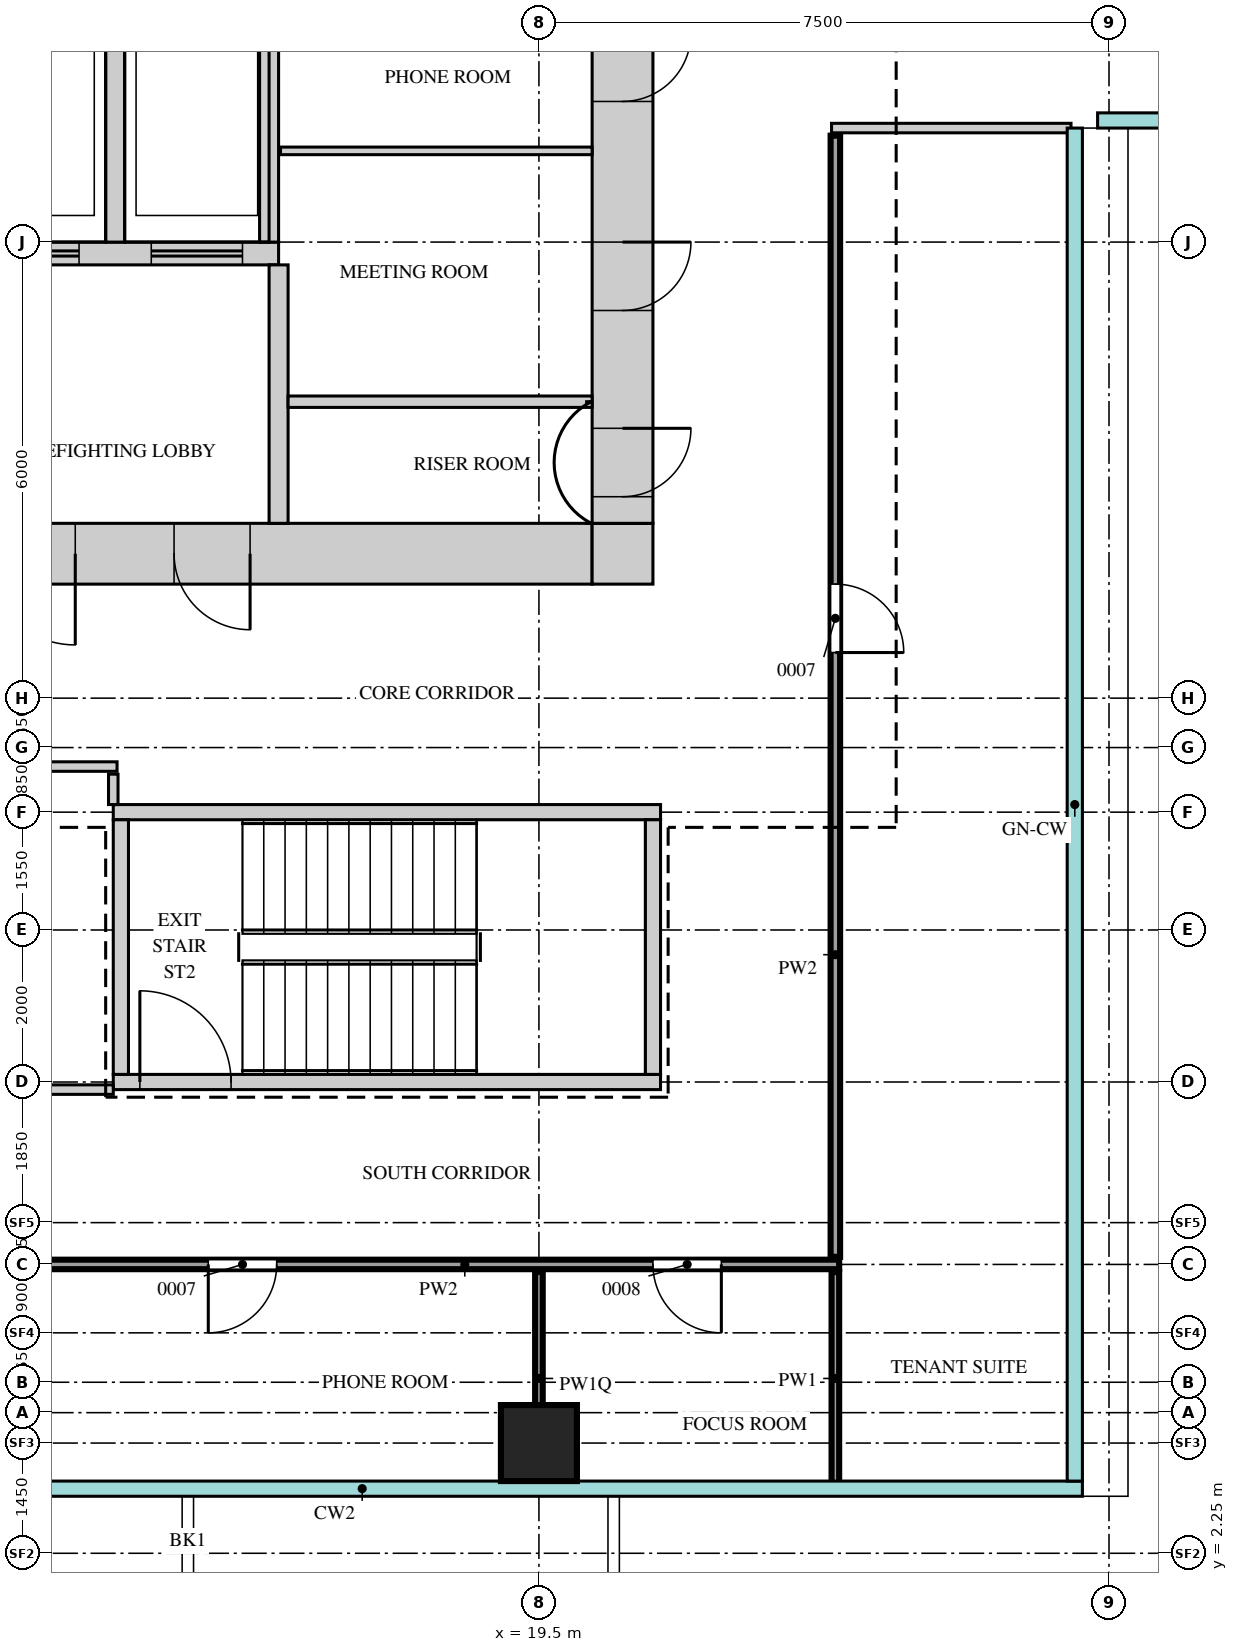
"""IFC4 building model, lengths in metres.
Left out: names, types, materials, properties, quantities, classifications, styles, units other than length and angle.
Written with IfcOpenShell. Run it as: python <this file> out.ifc"""

import sys

from ifc_helpers import new_model, si_unit, direction, frame, frame_2d, origin, origin_2d, place, context, subcontext, project, spatial, rectangle, extrude, source, transform, mapped, element, fill, save


model = new_model("IFC4")
c1 = context("Model", 3, precision=1e-05, world=origin(), true_north=direction((0.0, 1.0)))
c2 = subcontext(c1, "Body", "Model", "MODEL_VIEW")
j1 = project(units=[si_unit("LENGTHUNIT", "METRE"), si_unit("PLANEANGLEUNIT", "RADIAN")], contexts=[c1])
p1 = place(None, origin())
s1 = spatial("IfcSite", under=j1, at=p1, CompositionType="ELEMENT")
p2 = place(p1, origin())
s2 = spatial("IfcBuilding", under=s1, at=p2, CompositionType="ELEMENT")
p3 = place(p2, frame((0.0, 0.0, 172.7)))
s3 = spatial("IfcBuildingStorey", under=s2, at=p3, CompositionType="ELEMENT", Elevation=172.7)
m1 = source(origin(), c2, "Body", "SweptSolid", [
    extrude(rectangle(XDim=13.4, YDim=0.8, at=frame_2d((6.7, 0.0))), origin(), (0.0, 0.0, 1.0), 3.75),
])
p4 = place(p3, frame((6.8, 15.4, 0.0), z_axis=(0.0, 0.0, 1.0), x_axis=(1.0, 0.0, 0.0)))
e1 = element("IfcWall", 1, at=p4, inside=s3, PredefinedType="SHEAR", context=c2, shape_type="MappedRepresentation", body=[
    mapped(m1, transform((0.0, 0.0, 0.0))),
])
m2 = source(origin(), c2, "Body", "SweptSolid", [
    extrude(rectangle(XDim=1.2, YDim=2.1, at=frame_2d((0.6, 1.05))), frame((0.0, 0.41, 0.0), z_axis=(0.0, -1.0, 0.0), x_axis=(1.0, 0.0, 0.0)), (0.0, 0.0, 1.0), 0.82),
])
p5 = place(p4, frame((5.4, 0.0, 0.0)))
e2 = element("IfcOpeningElement", 2, at=p5, cuts=e1, PredefinedType="OPENING", context=c2, shape_type="MappedRepresentation", body=[
    mapped(m2, transform((0.0, 0.0, 0.0))),
])
p6 = place(p4, frame((2.05, 0.0, 0.0)))
e3 = element("IfcOpeningElement", 3, at=p6, cuts=e1, PredefinedType="OPENING", context=c2, shape_type="MappedRepresentation", body=[
    mapped(m2, transform((0.0, 0.0, 0.0))),
])
m3 = source(origin(), c2, "Body", "SweptSolid", [
    extrude(rectangle(XDim=1.0, YDim=2.1, at=frame_2d((0.5, 1.05))), frame((0.0, 0.41, 0.0), z_axis=(0.0, -1.0, 0.0), x_axis=(1.0, 0.0, 0.0)), (0.0, 0.0, 1.0), 0.82),
])
p7 = place(p4, frame((7.9, 0.0, 0.0)))
e4 = element("IfcOpeningElement", 4, at=p7, cuts=e1, PredefinedType="OPENING", context=c2, shape_type="MappedRepresentation", body=[
    mapped(m3, transform((0.0, 0.0, 0.0))),
])
m4 = source(origin(), c2, "Body", "SweptSolid", [
    extrude(rectangle(XDim=0.8, YDim=0.8, at=frame_2d((0.4, 0.0))), origin(), (0.0, 0.0, 1.0), 3.75),
])
p8 = place(p3, frame((20.2, 15.4, 0.0), z_axis=(0.0, 0.0, 1.0), x_axis=(1.0, 0.0, 0.0)))
e5 = element("IfcWall", 5, at=p8, inside=s3, PredefinedType="SHEAR", context=c2, shape_type="MappedRepresentation", body=[
    mapped(m4, transform((0.0, 0.0, 0.0))),
])
m5 = source(origin(), c2, "Body", "SweptSolid", [
    extrude(rectangle(XDim=22.4, YDim=0.8, at=frame_2d((11.2, 0.0))), origin(), (0.0, 0.0, 1.0), 3.75),
])
p9 = place(p3, frame((20.6, 15.8, 0.0), z_axis=(0.0, 0.0, 1.0), x_axis=(0.0, 1.0, 0.0)))
e6 = element("IfcWall", 6, at=p9, inside=s3, PredefinedType="SHEAR", context=c2, shape_type="MappedRepresentation", body=[
    mapped(m5, transform((0.0, 0.0, 0.0))),
])
m6 = source(origin(), c2, "Body", "SweptSolid", [
    extrude(rectangle(XDim=1.8, YDim=2.1, at=frame_2d((0.9, 1.05))), frame((0.0, 0.41, 0.0), z_axis=(0.0, -1.0, 0.0), x_axis=(1.0, 0.0, 0.0)), (0.0, 0.0, 1.0), 0.82),
])
p10 = place(p9, frame((10.7, 0.0, 0.0)))
e7 = element("IfcOpeningElement", 7, at=p10, cuts=e6, PredefinedType="OPENING", context=c2, shape_type="MappedRepresentation", body=[
    mapped(m6, transform((0.0, 0.0, 0.0))),
])
m7 = source(origin(), c2, "Body", "SweptSolid", [
    extrude(rectangle(XDim=0.9, YDim=2.1, at=frame_2d((0.45, 1.05))), frame((0.0, 0.41, 0.0), z_axis=(0.0, -1.0, 0.0), x_axis=(1.0, 0.0, 0.0)), (0.0, 0.0, 1.0), 0.82),
])
p11 = place(p9, frame((0.35, 0.0, 0.0)))
e8 = element("IfcOpeningElement", 8, at=p11, cuts=e6, PredefinedType="OPENING", context=c2, shape_type="MappedRepresentation", body=[
    mapped(m7, transform((0.0, 0.0, 0.0))),
])
p12 = place(p9, frame((2.8, 0.0, 0.0)))
e9 = element("IfcOpeningElement", 9, at=p12, cuts=e6, PredefinedType="OPENING", context=c2, shape_type="MappedRepresentation", body=[
    mapped(m7, transform((0.0, 0.0, 0.0))),
])
p13 = place(p9, frame((5.55, 0.0, 0.0)))
e10 = element("IfcOpeningElement", 10, at=p13, cuts=e6, PredefinedType="OPENING", context=c2, shape_type="MappedRepresentation", body=[
    mapped(m7, transform((0.0, 0.0, 0.0))),
])
m8 = source(origin(), c2, "Body", "SweptSolid", [
    extrude(rectangle(XDim=7.2, YDim=0.2, at=frame_2d((3.6, 0.0))), origin(), (0.0, 0.0, 1.0), 3.75),
])
p14 = place(p3, frame((13.9, 12.0, 0.0), z_axis=(0.0, 0.0, 1.0), x_axis=(1.0, 0.0, 0.0)))
e11 = element("IfcWall", 11, at=p14, inside=s3, PredefinedType="SHEAR", context=c2, shape_type="MappedRepresentation", body=[
    mapped(m8, transform((0.0, 0.0, 0.0))),
])
p15 = place(p3, frame((13.9, 8.45, 0.0), z_axis=(0.0, 0.0, 1.0), x_axis=(1.0, 0.0, 0.0)))
e12 = element("IfcWall", 12, at=p15, inside=s3, PredefinedType="SHEAR", context=c2, shape_type="MappedRepresentation", body=[
    mapped(m8, transform((0.0, 0.0, 0.0))),
])
m9 = source(origin(), c2, "Body", "SweptSolid", [
    extrude(rectangle(XDim=1.2, YDim=2.1, at=frame_2d((0.6, 1.05))), frame((0.0, 0.11, 0.0), z_axis=(0.0, -1.0, 0.0), x_axis=(1.0, 0.0, 0.0)), (0.0, 0.0, 1.0), 0.22),
])
p16 = place(p15, frame((0.35, 0.0, 0.0)))
e13 = element("IfcOpeningElement", 13, at=p16, cuts=e12, PredefinedType="OPENING", context=c2, shape_type="MappedRepresentation", body=[
    mapped(m9, transform((0.0, 0.0, 0.0))),
])
m10 = source(origin(), c2, "Body", "SweptSolid", [
    extrude(rectangle(XDim=3.35, YDim=0.2, at=frame_2d((1.675, 0.0))), origin(), (0.0, 0.0, 1.0), 3.75),
])
for number, where, z_axis, x_axis in (
    (14, (21.0, 8.55, 0.0), (0.0, 0.0, 1.0), (0.0, 1.0, 0.0)),
    (15, (14.0, 8.55, 0.0), (0.0, 0.0, 1.0), (0.0, 1.0, 0.0)),
):
    element("IfcWall", number, at=place(p3, frame(where, z_axis=z_axis, x_axis=x_axis)), inside=s3, PredefinedType="SHEAR", context=c2, shape_type="MappedRepresentation", body=[
        mapped(m10, transform((0.0, 0.0, 0.0))),
    ])
m11 = source(origin(), c2, "Body", "SweptSolid", [
    extrude(rectangle(XDim=9.275, YDim=0.3, at=frame_2d((4.637, 0.0))), origin(), (0.0, 0.0, 1.0), 3.75),
])
p17 = place(p3, frame((6.8, 19.35, 0.0), z_axis=(0.0, 0.0, 1.0), x_axis=(1.0, 0.0, 0.0)))
e16 = element("IfcWall", 16, at=p17, inside=s3, PredefinedType="STANDARD", context=c2, shape_type="MappedRepresentation", body=[
    mapped(m11, transform((0.0, 0.0, 0.0))),
])
m12 = source(origin(), c2, "Body", "SweptSolid", [
    extrude(rectangle(XDim=1.2, YDim=2.1, at=frame_2d((0.6, 1.05))), frame((0.0, 0.16, 0.0), z_axis=(0.0, -1.0, 0.0), x_axis=(1.0, 0.0, 0.0)), (0.0, 0.0, 1.0), 0.32),
])
p18 = place(p17, frame((0.85, 0.0, 0.0)))
e17 = element("IfcOpeningElement", 17, at=p18, cuts=e16, PredefinedType="OPENING", context=c2, shape_type="MappedRepresentation", body=[
    mapped(m12, transform((0.0, 0.0, 0.0))),
])
p19 = place(p17, frame((3.2, 0.0, 0.0)))
e18 = element("IfcOpeningElement", 18, at=p19, cuts=e16, PredefinedType="OPENING", context=c2, shape_type="MappedRepresentation", body=[
    mapped(m12, transform((0.0, 0.0, 0.0))),
])
p20 = place(p17, frame((5.45, 0.0, 0.0)))
e19 = element("IfcOpeningElement", 19, at=p20, cuts=e16, PredefinedType="OPENING", context=c2, shape_type="MappedRepresentation", body=[
    mapped(m12, transform((0.0, 0.0, 0.0))),
])
p21 = place(p17, frame((7.6, 0.0, 0.0)))
e20 = element("IfcOpeningElement", 20, at=p21, cuts=e16, PredefinedType="OPENING", context=c2, shape_type="MappedRepresentation", body=[
    mapped(m12, transform((0.0, 0.0, 0.0))),
])
m13 = source(origin(), c2, "Body", "SweptSolid", [
    extrude(rectangle(XDim=3.1, YDim=0.25, at=frame_2d((1.55, 0.0))), origin(), (0.0, 0.0, 1.0), 3.75),
])
for number, where, z_axis, x_axis in (
    (21, (13.925, 19.5, 0.0), (0.0, 0.0, 1.0), (0.0, 1.0, 0.0)),
    (22, (15.95, 19.5, 0.0), (0.0, 0.0, 1.0), (0.0, 1.0, 0.0)),
):
    element("IfcWall", number, at=place(p3, frame(where, z_axis=z_axis, x_axis=x_axis)), inside=s3, PredefinedType="STANDARD", context=c2, shape_type="MappedRepresentation", body=[
        mapped(m13, transform((0.0, 0.0, 0.0))),
    ])
m14 = source(origin(), c2, "Body", "SweptSolid", [
    extrude(rectangle(XDim=3.4, YDim=0.25, at=frame_2d((1.7, 0.0))), origin(), (0.0, 0.0, 1.0), 3.75),
])
p22 = place(p3, frame((16.075, 15.8, 0.0), z_axis=(0.0, 0.0, 1.0), x_axis=(0.0, 1.0, 0.0)))
e23 = element("IfcWall", 23, at=p22, inside=s3, PredefinedType="STANDARD", context=c2, shape_type="MappedRepresentation", body=[
    mapped(m14, transform((0.0, 0.0, 0.0))),
])
m15 = source(origin(), c2, "Body", "SweptSolid", [
    extrude(rectangle(XDim=1.0, YDim=1.0, at=origin_2d()), origin(), (0.0, 0.0, 1.0), 3.75),
])
p23 = place(p3, frame((19.5, 3.7, 0.0), z_axis=(0.0, 0.0, 1.0), x_axis=(1.0, 0.0, 0.0)))
e24 = element("IfcColumn", 24, at=p23, inside=s3, PredefinedType="COLUMN", context=c2, shape_type="MappedRepresentation", body=[
    mapped(m15, transform((0.0, 0.0, 0.0))),
])
m16 = source(origin(), c2, "Body", "SweptSolid", [
    extrude(rectangle(XDim=2.8, YDim=0.1, at=frame_2d((1.4, 0.0))), origin(), (0.0, 0.0, 1.0), 3.42),
])
p24 = place(p3, frame((19.5, 3.15, 0.0), z_axis=(0.0, 0.0, 1.0), x_axis=(0.0, 1.0, 0.0)))
e25 = element("IfcWall", 25, at=p24, inside=s3, PredefinedType="PARTITIONING", context=c2, shape_type="MappedRepresentation", body=[
    mapped(m16, transform((0.0, 0.0, 0.0))),
])
m17 = source(origin(), c2, "Body", "SweptSolid", [
    extrude(rectangle(XDim=2.8, YDim=0.1, at=frame_2d((1.4, 0.0))), origin(), (0.0, 0.0, 1.0), 3.8),
])
p25 = place(p3, frame((23.4, 3.15, 0.0), z_axis=(0.0, 0.0, 1.0), x_axis=(0.0, 1.0, 0.0)))
e26 = element("IfcWall", 26, at=p25, inside=s3, PredefinedType="PARTITIONING", context=c2, shape_type="MappedRepresentation", body=[
    mapped(m17, transform((0.0, 0.0, 0.0))),
])
m18 = source(origin(), c2, "Body", "SweptSolid", [
    extrude(rectangle(XDim=15.8, YDim=0.125, at=frame_2d((7.9, 0.0))), origin(), (0.0, 0.0, 1.0), 3.8),
])
p26 = place(p3, frame((7.65, 6.05, 0.0), z_axis=(0.0, 0.0, 1.0), x_axis=(1.0, 0.0, 0.0)))
e27 = element("IfcWall", 27, at=p26, inside=s3, PredefinedType="PARTITIONING", context=c2, shape_type="MappedRepresentation", body=[
    mapped(m18, transform((0.0, 0.0, 0.0))),
])
m19 = source(origin(), c2, "Body", "SweptSolid", [
    extrude(rectangle(XDim=0.9, YDim=2.1, at=frame_2d((0.45, 1.05))), frame((0.0, 0.073, 0.0), z_axis=(0.0, -1.0, 0.0), x_axis=(1.0, 0.0, 0.0)), (0.0, 0.0, 1.0), 0.145),
])
p27 = place(p26, frame((2.05, 0.0, 0.0)))
e28 = element("IfcOpeningElement", 28, at=p27, cuts=e27, PredefinedType="OPENING", context=c2, shape_type="MappedRepresentation", body=[
    mapped(m19, transform((0.0, 0.0, 0.0))),
])
p28 = place(p26, frame((7.5, 0.0, 0.0)))
e29 = element("IfcOpeningElement", 29, at=p28, cuts=e27, PredefinedType="OPENING", context=c2, shape_type="MappedRepresentation", body=[
    mapped(m19, transform((0.0, 0.0, 0.0))),
])
p29 = place(p26, frame((13.35, 0.0, 0.0)))
e30 = element("IfcOpeningElement", 30, at=p29, cuts=e27, PredefinedType="OPENING", context=c2, shape_type="MappedRepresentation", body=[
    mapped(m19, transform((0.0, 0.0, 0.0))),
])
m20 = source(origin(), c2, "Body", "SweptSolid", [
    extrude(rectangle(XDim=14.75, YDim=0.125, at=frame_2d((7.375, 0.0))), origin(), (0.0, 0.0, 1.0), 3.8),
])
p30 = place(p3, frame((23.4, 6.15, 0.0), z_axis=(0.0, 0.0, 1.0), x_axis=(0.0, 1.0, 0.0)))
e31 = element("IfcWall", 31, at=p30, inside=s3, PredefinedType="PARTITIONING", context=c2, shape_type="MappedRepresentation", body=[
    mapped(m20, transform((0.0, 0.0, 0.0))),
])
p31 = place(p30, frame((7.95, 0.0, 0.0)))
e32 = element("IfcOpeningElement", 32, at=p31, cuts=e31, PredefinedType="OPENING", context=c2, shape_type="MappedRepresentation", body=[
    mapped(m19, transform((0.0, 0.0, 0.0))),
])
m21 = source(origin(), c2, "Body", "SweptSolid", [
    extrude(rectangle(XDim=7.95, YDim=0.125, at=frame_2d((3.975, 0.0))), origin(), (0.0, 0.0, 1.0), 3.25),
])
p32 = place(p3, frame((5.95, 8.35, 0.0), z_axis=(0.0, 0.0, 1.0), x_axis=(1.0, 0.0, 0.0)))
e33 = element("IfcWall", 33, at=p32, inside=s3, PredefinedType="PARTITIONING", context=c2, shape_type="MappedRepresentation", body=[
    mapped(m21, transform((0.0, 0.0, 0.0))),
])
p33 = place(p32, frame((3.8, 0.0, 0.0)))
e34 = element("IfcOpeningElement", 34, at=p33, cuts=e33, PredefinedType="OPENING", context=c2, shape_type="MappedRepresentation", body=[
    mapped(m19, transform((0.0, 0.0, 0.0))),
])
m22 = source(origin(), c2, "Body", "SweptSolid", [
    extrude(rectangle(XDim=0.4, YDim=0.125, at=frame_2d((0.2, 0.0))), origin(), (0.0, 0.0, 1.0), 3.8),
])
p34 = place(p3, frame((13.9, 12.1, 0.0), z_axis=(0.0, 0.0, 1.0), x_axis=(0.0, 1.0, 0.0)))
e35 = element("IfcWall", 35, at=p34, inside=s3, PredefinedType="PARTITIONING", context=c2, shape_type="MappedRepresentation", body=[
    mapped(m22, transform((0.0, 0.0, 0.0))),
])
m23 = source(origin(), c2, "Body", "SweptSolid", [
    extrude(rectangle(XDim=8.0, YDim=0.125, at=frame_2d((4.0, 0.0))), origin(), (0.0, 0.0, 1.0), 3.8),
])
p35 = place(p3, frame((5.95, 12.6, 0.0), z_axis=(0.0, 0.0, 1.0), x_axis=(1.0, 0.0, 0.0)))
e36 = element("IfcWall", 36, at=p35, inside=s3, PredefinedType="PARTITIONING", context=c2, shape_type="MappedRepresentation", body=[
    mapped(m23, transform((0.0, 0.0, 0.0))),
])
m24 = source(origin(), c2, "Body", "SweptSolid", [
    extrude(rectangle(XDim=4.0, YDim=0.15, at=frame_2d((2.0, 0.0))), origin(), (0.0, 0.0, 1.0), 3.8),
])
p36 = place(p3, frame((16.2, 17.4, 0.0), z_axis=(0.0, 0.0, 1.0), x_axis=(1.0, 0.0, 0.0)))
e37 = element("IfcWall", 37, at=p36, inside=s3, PredefinedType="PARTITIONING", context=c2, shape_type="MappedRepresentation", body=[
    mapped(m24, transform((0.0, 0.0, 0.0))),
])
m25 = source(origin(), c2, "Body", "SweptSolid", [
    extrude(rectangle(XDim=4.1, YDim=0.1, at=frame_2d((2.05, 0.0))), origin(), (0.0, 0.0, 1.0), 3.8),
])
p37 = place(p3, frame((16.1, 20.7, 0.0), z_axis=(0.0, 0.0, 1.0), x_axis=(1.0, 0.0, 0.0)))
e38 = element("IfcWall", 38, at=p37, inside=s3, PredefinedType="PARTITIONING", context=c2, shape_type="MappedRepresentation", body=[
    mapped(m25, transform((0.0, 0.0, 0.0))),
])
m26 = source(origin(), c2, "Body", "SweptSolid", [
    extrude(rectangle(XDim=3.15, YDim=0.125, at=frame_2d((1.575, 0.0))), origin(), (0.0, 0.0, 1.0), 3.8),
])
p38 = place(p3, frame((23.35, 21.0, 0.0), z_axis=(0.0, 0.0, 1.0), x_axis=(1.0, 0.0, 0.0)))
e39 = element("IfcWall", 39, at=p38, inside=s3, PredefinedType="PARTITIONING", context=c2, shape_type="MappedRepresentation", body=[
    mapped(m26, transform((0.0, 0.0, 0.0))),
])
m27 = source(origin(), c2, "Body", "SweptSolid", [
    extrude(rectangle(XDim=0.9, YDim=2.1, at=frame_2d((0.45, 1.05))), frame((0.0, 0.35, 0.0), z_axis=(0.0, -1.0, 0.0), x_axis=(1.0, 0.0, 0.0)), (0.0, 0.0, 1.0), 0.7),
])
p39 = place(p11, origin())
e40 = element("IfcDoor", 40, at=p39, inside=s3, OperationType="SINGLE_SWING_RIGHT", PredefinedType="DOOR", context=c2, shape_type="MappedRepresentation", body=[
    mapped(m27, transform((0.0, 0.0, 0.0))),
])
fill(e8, e40)
p40 = place(p12, origin())
e41 = element("IfcDoor", 41, at=p40, inside=s3, OperationType="SINGLE_SWING_RIGHT", PredefinedType="DOOR", context=c2, shape_type="MappedRepresentation", body=[
    mapped(m27, transform((0.0, 0.0, 0.0))),
])
fill(e9, e41)
p41 = place(p13, origin())
e42 = element("IfcDoor", 42, at=p41, inside=s3, OperationType="SINGLE_SWING_RIGHT", PredefinedType="DOOR", context=c2, shape_type="MappedRepresentation", body=[
    mapped(m27, transform((0.0, 0.0, 0.0))),
])
fill(e10, e42)
m28 = source(origin(), c2, "Body", "SweptSolid", [
    extrude(rectangle(XDim=1.2, YDim=2.1, at=frame_2d((0.6, 1.05))), frame((0.0, 0.35, 0.0), z_axis=(0.0, -1.0, 0.0), x_axis=(1.0, 0.0, 0.0)), (0.0, 0.0, 1.0), 0.7),
])
p42 = place(p5, origin())
e43 = element("IfcDoor", 43, at=p42, inside=s3, OperationType="SINGLE_SWING_RIGHT", PredefinedType="DOOR", context=c2, shape_type="MappedRepresentation", body=[
    mapped(m28, transform((0.0, 0.0, 0.0))),
])
fill(e2, e43)
m29 = source(origin(), c2, "Body", "SweptSolid", [
    extrude(rectangle(XDim=1.0, YDim=2.1, at=frame_2d((0.5, 1.05))), frame((0.0, 0.35, 0.0), z_axis=(0.0, -1.0, 0.0), x_axis=(1.0, 0.0, 0.0)), (0.0, 0.0, 1.0), 0.7),
])
p43 = place(p7, origin())
e44 = element("IfcDoor", 44, at=p43, inside=s3, OperationType="SINGLE_SWING_RIGHT", PredefinedType="DOOR", context=c2, shape_type="MappedRepresentation", body=[
    mapped(m29, transform((0.0, 0.0, 0.0))),
])
fill(e4, e44)
m30 = source(origin(), c2, "Body", "SweptSolid", [
    extrude(rectangle(XDim=0.9, YDim=2.1, at=frame_2d((0.45, 1.05))), frame((0.0, 0.025, 0.0), z_axis=(0.0, -1.0, 0.0), x_axis=(1.0, 0.0, 0.0)), (0.0, 0.0, 1.0), 0.05),
])
p44 = place(p31, origin())
e45 = element("IfcDoor", 45, at=p44, inside=s3, OperationType="SINGLE_SWING_LEFT", PredefinedType="DOOR", context=c2, shape_type="MappedRepresentation", body=[
    mapped(m30, transform((0.0, 0.0, 0.0))),
])
fill(e32, e45)
p45 = place(p28, origin())
e46 = element("IfcDoor", 46, at=p45, inside=s3, OperationType="SINGLE_SWING_LEFT", PredefinedType="DOOR", context=c2, shape_type="MappedRepresentation", body=[
    mapped(m30, transform((0.0, 0.0, 0.0))),
])
fill(e29, e46)
p46 = place(p29, origin())
e47 = element("IfcDoor", 47, at=p46, inside=s3, OperationType="SINGLE_SWING_RIGHT", PredefinedType="DOOR", context=c2, shape_type="MappedRepresentation", body=[
    mapped(m30, transform((0.0, 0.0, 0.0))),
])
fill(e30, e47)
m31 = source(origin(), c2, "Body", "SweptSolid", [
    extrude(rectangle(XDim=1.2, YDim=2.1, at=frame_2d((0.6, 1.05))), frame((0.0, 0.025, 0.0), z_axis=(0.0, -1.0, 0.0), x_axis=(1.0, 0.0, 0.0)), (0.0, 0.0, 1.0), 0.05),
])
p47 = place(p16, origin())
e48 = element("IfcDoor", 48, at=p47, inside=s3, OperationType="SINGLE_SWING_RIGHT", PredefinedType="DOOR", context=c2, shape_type="MappedRepresentation", body=[
    mapped(m31, transform((0.0, 0.0, 0.0))),
])
fill(e13, e48)
p48 = place(p20, origin())
e49 = element("IfcDoor", 49, at=p48, inside=s3, OperationType="DOUBLE_DOOR_SLIDING", PredefinedType="DOOR", context=c2, shape_type="MappedRepresentation", body=[
    mapped(m31, transform((0.0, 0.0, 0.0))),
])
fill(e19, e49)
p49 = place(p21, origin())
e50 = element("IfcDoor", 50, at=p49, inside=s3, OperationType="DOUBLE_DOOR_SLIDING", PredefinedType="DOOR", context=c2, shape_type="MappedRepresentation", body=[
    mapped(m31, transform((0.0, 0.0, 0.0))),
])
fill(e20, e50)
save(model, sys.argv[1])
